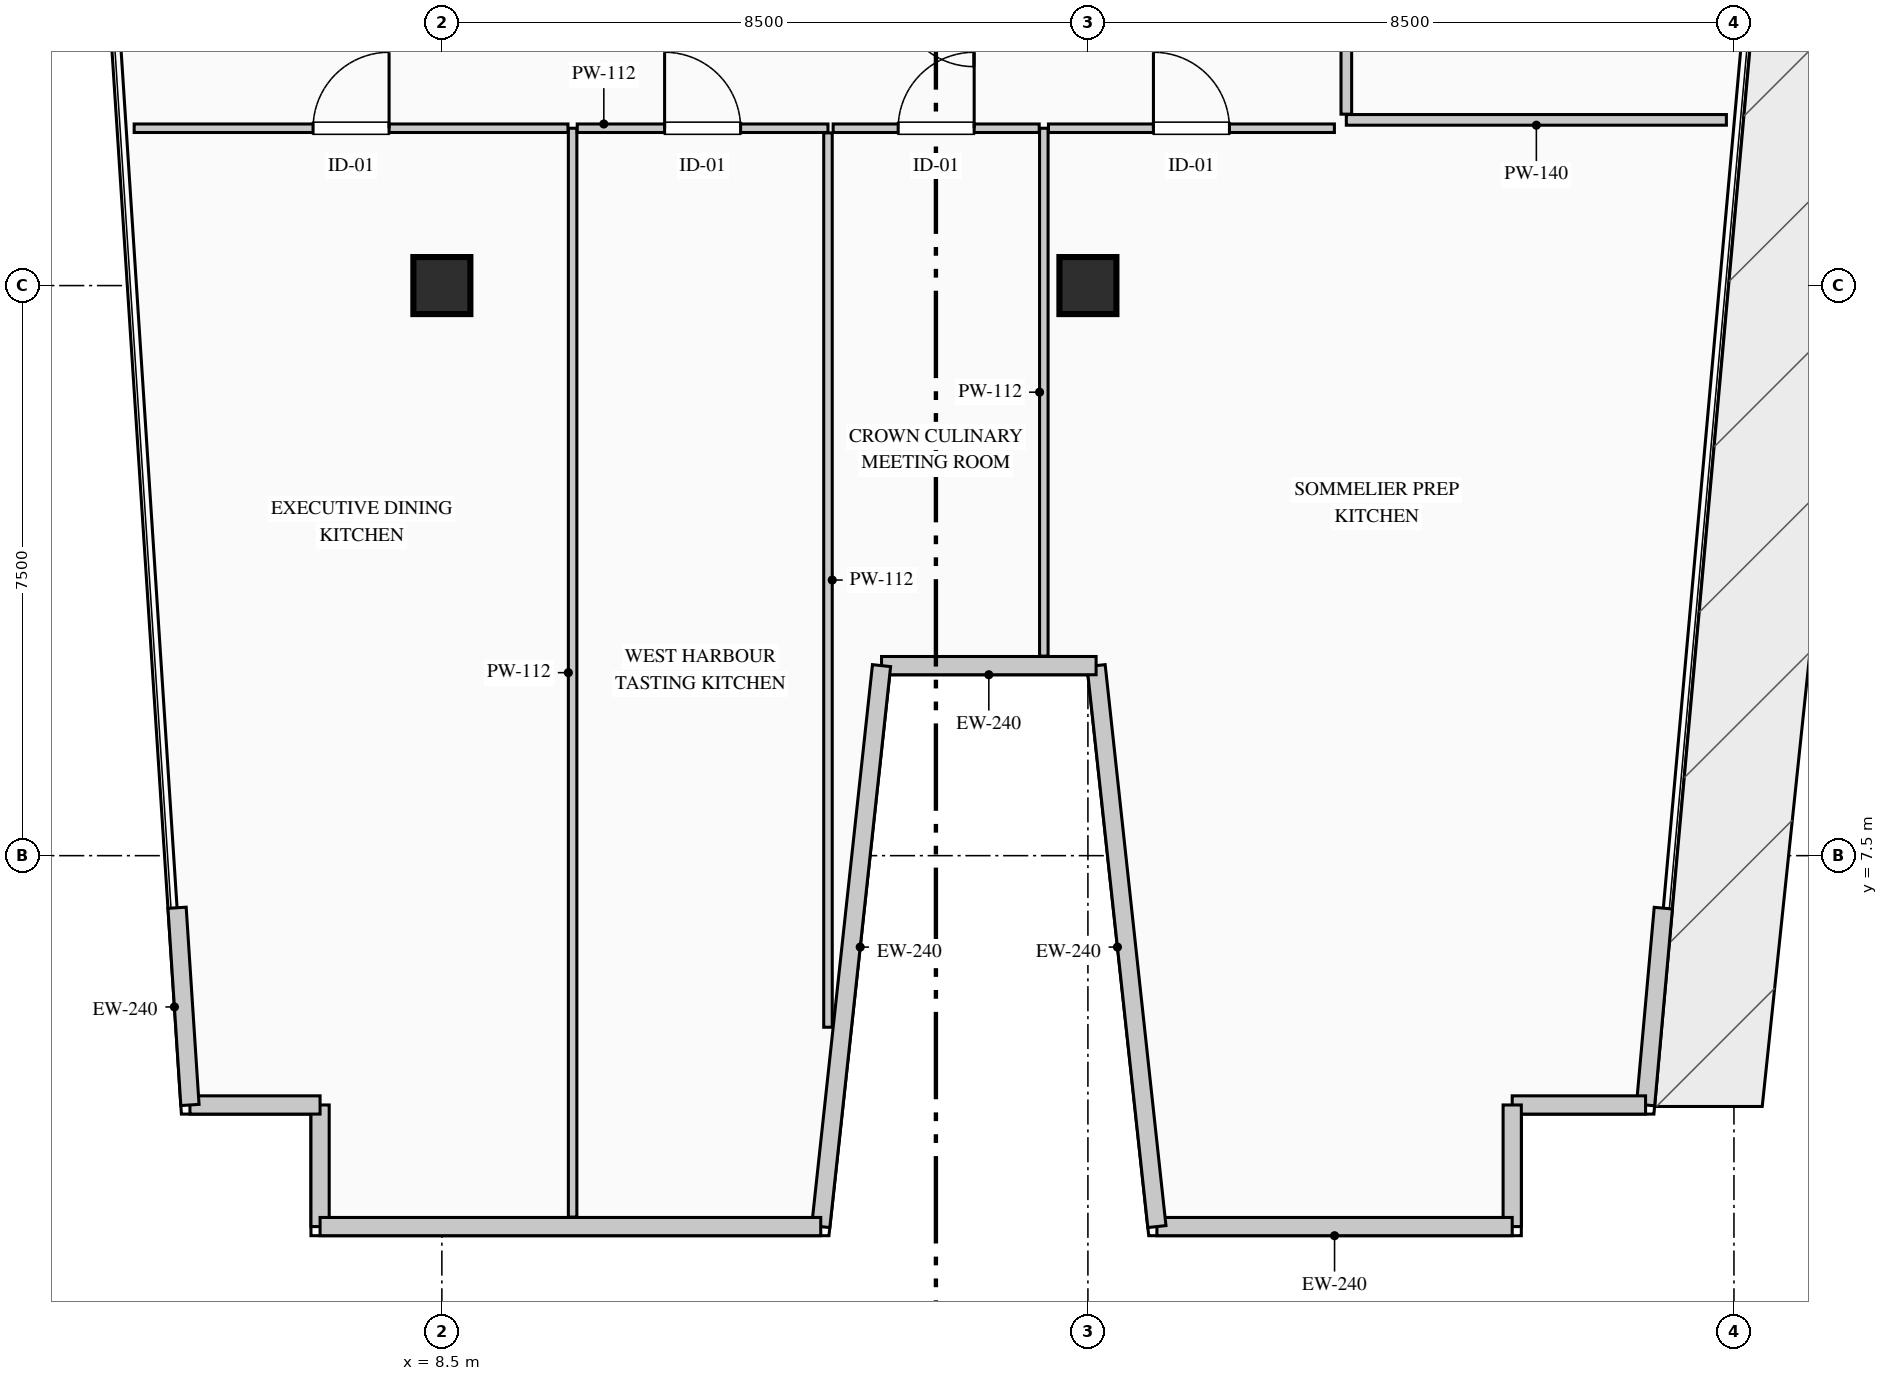
"""IFC4 building model, lengths in metres.
Left out: names, types, materials, properties, quantities, classifications, styles, units other than length and angle.
Written with IfcOpenShell. Run it as: python <this file> out.ifc"""

import sys

from ifc_helpers import new_model, si_unit, direction, frame, frame_2d, origin, origin_2d, place, context, subcontext, project, spatial, rectangle, extrude, element, fill, save


model = new_model("IFC4")
c1 = context("Model", 3, precision=1e-05, world=origin(), true_north=direction((0.0, 1.0)))
c2 = subcontext(c1, "Body", "Model", "MODEL_VIEW")
j1 = project(units=[si_unit("LENGTHUNIT", "METRE"), si_unit("PLANEANGLEUNIT", "RADIAN")], contexts=[c1])
p1 = place(None, origin())
s1 = spatial("IfcSite", under=j1, at=p1, CompositionType="ELEMENT")
p2 = place(p1, origin())
s2 = spatial("IfcBuilding", under=s1, at=p2, CompositionType="ELEMENT")
p3 = place(p2, frame((0.0, 0.0, 300.15)))
s3 = spatial("IfcBuildingStorey", under=s2, at=p3, CompositionType="ELEMENT", Elevation=300.15)
for number, where, z_axis, x_axis in (
    (1, (8.5, 15.0, 0.0), (0.0, 0.0, 1.0), (1.0, 0.0, 0.0)),
    (2, (17.0, 15.0, 0.0), (0.0, 0.0, 1.0), (1.0, 0.0, 0.0)),
):
    element("IfcColumn", number, at=place(p3, frame(where, z_axis=z_axis, x_axis=x_axis)), inside=s3, PredefinedType="COLUMN", context=c2, shape_type="SweptSolid", body=[
        extrude(rectangle(XDim=0.75, YDim=0.75, at=origin_2d()), origin(), (0.0, 0.0, 1.0), 3.95),
    ])
p4 = place(p3, frame((6.897, 2.62, 0.0), z_axis=(0.0, 0.0, 1.0), x_axis=(0.0, 1.0, 0.0)))
e3 = element("IfcWall", 3, at=p4, inside=s3, PredefinedType="STANDARD", context=c2, shape_type="SweptSolid", body=[
    extrude(rectangle(XDim=1.6, YDim=0.24, at=frame_2d((0.8, 0.0))), origin(), (0.0, 0.0, 1.0), 3.7),
])
p5 = place(p3, frame((6.897, 4.22, 0.0), z_axis=(0.0, 0.0, 1.0), x_axis=(-1.0, 0.0, 0.0)))
e4 = element("IfcWall", 4, at=p5, inside=s3, PredefinedType="STANDARD", context=c2, shape_type="SweptSolid", body=[
    extrude(rectangle(XDim=1.712, YDim=0.24, at=frame_2d((0.856, 0.0))), origin(), (0.0, 0.0, 1.0), 3.7),
])
for number, where, z_axis, x_axis in (
    (5, (5.185, 4.22, 0.0), (0.0, 0.0, 1.0), (-0.065, 0.998, 0.0)),
    (6, (24.571, 6.81, 0.0), (0.0, 0.0, 1.0), (-0.09, -0.996, 0.0)),
):
    element("IfcWall", number, at=place(p3, frame(where, z_axis=z_axis, x_axis=x_axis)), inside=s3, PredefinedType="STANDARD", context=c2, shape_type="SweptSolid", body=[
        extrude(rectangle(XDim=2.6, YDim=0.24, at=frame_2d((1.3, 0.0))), origin(), (0.0, 0.0, 1.0), 3.7),
    ])
p6 = place(p3, frame((24.337, 4.22, 0.0), z_axis=(0.0, 0.0, 1.0), x_axis=(-1.0, 0.0, 0.0)))
e7 = element("IfcWall", 7, at=p6, inside=s3, PredefinedType="STANDARD", context=c2, shape_type="SweptSolid", body=[
    extrude(rectangle(XDim=1.755, YDim=0.24, at=frame_2d((0.877, 0.0))), origin(), (0.0, 0.0, 1.0), 3.7),
])
p7 = place(p3, frame((22.583, 4.22, 0.0), z_axis=(0.0, 0.0, 1.0), x_axis=(0.0, -1.0, 0.0)))
e8 = element("IfcWall", 8, at=p7, inside=s3, PredefinedType="STANDARD", context=c2, shape_type="SweptSolid", body=[
    extrude(rectangle(XDim=1.6, YDim=0.24, at=frame_2d((0.8, 0.0))), origin(), (0.0, 0.0, 1.0), 3.7),
])
p8 = place(p3, frame((22.583, 2.62, 0.0), z_axis=(0.0, 0.0, 1.0), x_axis=(-1.0, 0.0, 0.0)))
e9 = element("IfcWall", 9, at=p8, inside=s3, PredefinedType="STANDARD", context=c2, shape_type="SweptSolid", body=[
    extrude(rectangle(XDim=4.675, YDim=0.24, at=frame_2d((2.337, 0.0))), origin(), (0.0, 0.0, 1.0), 3.7),
])
p9 = place(p3, frame((17.908, 2.62, 0.0), z_axis=(0.0, 0.0, 1.0), x_axis=(-0.107777936076, 0.994174992894, 0.0)))
e10 = element("IfcWall", 10, at=p9, inside=s3, PredefinedType="STANDARD", context=c2, shape_type="SweptSolid", body=[
    extrude(rectangle(XDim=7.423, YDim=0.24, at=frame_2d((3.711, 0.0))), origin(), (0.0, 0.0, 1.0), 3.7),
])
p10 = place(p3, frame((17.108, 10.0, 0.0), z_axis=(0.0, 0.0, 1.0), x_axis=(-1.0, 0.0, 0.0)))
e11 = element("IfcWall", 11, at=p10, inside=s3, PredefinedType="STANDARD", context=c2, shape_type="SweptSolid", body=[
    extrude(rectangle(XDim=2.823, YDim=0.24, at=frame_2d((1.411, 0.0))), origin(), (0.0, 0.0, 1.0), 3.7),
])
p11 = place(p3, frame((14.285, 10.0, 0.0), z_axis=(0.0, 0.0, 1.0), x_axis=(-0.107777936076, -0.994174992894, 0.0)))
e12 = element("IfcWall", 12, at=p11, inside=s3, PredefinedType="STANDARD", context=c2, shape_type="SweptSolid", body=[
    extrude(rectangle(XDim=7.423, YDim=0.24, at=frame_2d((3.711, 0.0))), origin(), (0.0, 0.0, 1.0), 3.7),
])
p12 = place(p3, frame((13.485, 2.62, 0.0), z_axis=(0.0, 0.0, 1.0), x_axis=(-1.0, 0.0, 0.0)))
e13 = element("IfcWall", 13, at=p12, inside=s3, PredefinedType="STANDARD", context=c2, shape_type="SweptSolid", body=[
    extrude(rectangle(XDim=6.587, YDim=0.24, at=frame_2d((3.294, 0.0))), origin(), (0.0, 0.0, 1.0), 3.7),
])
p13 = place(p3, frame((25.4, 17.18, 0.0), z_axis=(0.0, 0.0, 1.0), x_axis=(-1.0, 0.0, 0.0)))
e14 = element("IfcWall", 14, at=p13, inside=s3, PredefinedType="PARTITIONING", context=c2, shape_type="SweptSolid", body=[
    extrude(rectangle(XDim=5.0, YDim=0.14, at=frame_2d((2.5, 0.0))), origin(), (0.0, 0.0, 1.0), 3.7),
])
p14 = place(p3, frame((20.4, 17.255, 0.0), z_axis=(0.0, 0.0, 1.0), x_axis=(0.0, 1.0, 0.0)))
e15 = element("IfcWall", 15, at=p14, inside=s3, PredefinedType="PARTITIONING", context=c2, shape_type="SweptSolid", body=[
    extrude(rectangle(XDim=3.995, YDim=0.14, at=frame_2d((1.998, 0.0))), origin(), (0.0, 0.0, 1.0), 3.7),
])
p15 = place(p14, frame((1.522, 0.0, 0.0)))
e16 = element("IfcOpeningElement", 16, at=p15, cuts=e15, PredefinedType="OPENING", context=c2, shape_type="SweptSolid", body=[
    extrude(rectangle(XDim=0.95, YDim=2.15, at=frame_2d((0.475, 1.075))), frame((0.0, 0.08, 0.0), z_axis=(0.0, -1.0, 0.0), x_axis=(1.0, 0.0, 0.0)), (0.0, 0.0, 1.0), 0.16),
])
p16 = place(p3, frame((10.22, 2.745, 0.0), z_axis=(0.0, 0.0, 1.0), x_axis=(0.0, 1.0, 0.0)))
e17 = element("IfcWall", 17, at=p16, inside=s3, PredefinedType="PARTITIONING", context=c2, shape_type="SweptSolid", body=[
    extrude(rectangle(XDim=14.325, YDim=0.112, at=frame_2d((7.163, 0.0))), origin(), (0.0, 0.0, 1.0), 3.325),
])
p17 = place(p3, frame((10.281, 17.07, 0.0), z_axis=(0.0, 0.0, 1.0), x_axis=(1.0, 0.0, 0.0)))
e18 = element("IfcWall", 18, at=p17, inside=s3, PredefinedType="PARTITIONING", context=c2, shape_type="SweptSolid", body=[
    extrude(rectangle(XDim=3.299, YDim=0.112, at=frame_2d((1.649, 0.0))), origin(), (0.0, 0.0, 1.0), 3.7),
])
p18 = place(p17, frame((1.149, 0.0, 0.0)))
e19 = element("IfcOpeningElement", 19, at=p18, cuts=e18, PredefinedType="OPENING", context=c2, shape_type="SweptSolid", body=[
    extrude(rectangle(XDim=1.0, YDim=2.15, at=frame_2d((0.5, 1.075))), frame((0.0, 0.066, 0.0), z_axis=(0.0, -1.0, 0.0), x_axis=(1.0, 0.0, 0.0)), (0.0, 0.0, 1.0), 0.132),
])
p19 = place(p3, frame((13.58, 17.009, 0.0), z_axis=(0.0, 0.0, 1.0), x_axis=(0.0, -1.0, 0.0)))
e20 = element("IfcWall", 20, at=p19, inside=s3, PredefinedType="PARTITIONING", context=c2, shape_type="SweptSolid", body=[
    extrude(rectangle(XDim=11.766, YDim=0.112, at=frame_2d((5.883, 0.0))), origin(), (0.0, 0.0, 1.0), 3.7),
])
p20 = place(p3, frame((4.451, 17.07, 0.0), z_axis=(0.0, 0.0, 1.0), x_axis=(1.0, 0.0, 0.0)))
e21 = element("IfcWall", 21, at=p20, inside=s3, PredefinedType="PARTITIONING", context=c2, shape_type="SweptSolid", body=[
    extrude(rectangle(XDim=5.708, YDim=0.112, at=frame_2d((2.854, 0.0))), origin(), (0.0, 0.0, 1.0), 3.7),
])
p21 = place(p20, frame((2.354, 0.0, 0.0)))
e22 = element("IfcOpeningElement", 22, at=p21, cuts=e21, PredefinedType="OPENING", context=c2, shape_type="SweptSolid", body=[
    extrude(rectangle(XDim=1.0, YDim=2.15, at=frame_2d((0.5, 1.075))), frame((0.0, 0.066, 0.0), z_axis=(0.0, -1.0, 0.0), x_axis=(1.0, 0.0, 0.0)), (0.0, 0.0, 1.0), 0.132),
])
p22 = place(p3, frame((16.42, 10.125, 0.0), z_axis=(0.0, 0.0, 1.0), x_axis=(0.0, 1.0, 0.0)))
e23 = element("IfcWall", 23, at=p22, inside=s3, PredefinedType="PARTITIONING", context=c2, shape_type="SweptSolid", body=[
    extrude(rectangle(XDim=6.945, YDim=0.112, at=frame_2d((3.473, 0.0))), origin(), (0.0, 0.0, 1.0), 3.7),
])
p23 = place(p3, frame((16.481, 17.07, 0.0), z_axis=(0.0, 0.0, 1.0), x_axis=(1.0, 0.0, 0.0)))
e24 = element("IfcWall", 24, at=p23, inside=s3, PredefinedType="PARTITIONING", context=c2, shape_type="SweptSolid", body=[
    extrude(rectangle(XDim=3.762, YDim=0.112, at=frame_2d((1.881, 0.0))), origin(), (0.0, 0.0, 1.0), 3.7),
])
p24 = place(p23, frame((1.381, 0.0, 0.0)))
e25 = element("IfcOpeningElement", 25, at=p24, cuts=e24, PredefinedType="OPENING", context=c2, shape_type="SweptSolid", body=[
    extrude(rectangle(XDim=1.0, YDim=2.15, at=frame_2d((0.5, 1.075))), frame((0.0, 0.066, 0.0), z_axis=(0.0, -1.0, 0.0), x_axis=(1.0, 0.0, 0.0)), (0.0, 0.0, 1.0), 0.132),
])
p25 = place(p3, frame((13.648, 17.07, 0.0), z_axis=(0.0, 0.0, 1.0), x_axis=(1.0, 0.0, 0.0)))
e26 = element("IfcWall", 26, at=p25, inside=s3, PredefinedType="PARTITIONING", context=c2, shape_type="SweptSolid", body=[
    extrude(rectangle(XDim=2.711, YDim=0.112, at=frame_2d((1.355, 0.0))), origin(), (0.0, 0.0, 1.0), 3.7),
])
p26 = place(p25, frame((0.855, 0.0, 0.0)))
e27 = element("IfcOpeningElement", 27, at=p26, cuts=e26, PredefinedType="OPENING", context=c2, shape_type="SweptSolid", body=[
    extrude(rectangle(XDim=1.0, YDim=2.15, at=frame_2d((0.5, 1.075))), frame((0.0, 0.066, 0.0), z_axis=(0.0, -1.0, 0.0), x_axis=(1.0, 0.0, 0.0)), (0.0, 0.0, 1.0), 0.132),
])
p27 = place(p18, origin())
e28 = element("IfcDoor", 28, at=p27, inside=s3, OperationType="SINGLE_SWING_LEFT", PredefinedType="DOOR", context=c2, shape_type="SweptSolid", body=[
    extrude(rectangle(XDim=1.0, YDim=2.15, at=frame_2d((0.5, 1.075))), frame((0.0, 0.025, 0.0), z_axis=(0.0, -1.0, 0.0), x_axis=(1.0, 0.0, 0.0)), (0.0, 0.0, 1.0), 0.05),
])
fill(e19, e28)
p28 = place(p21, origin())
e29 = element("IfcDoor", 29, at=p28, inside=s3, OperationType="SINGLE_SWING_RIGHT", PredefinedType="DOOR", context=c2, shape_type="SweptSolid", body=[
    extrude(rectangle(XDim=1.0, YDim=2.15, at=frame_2d((0.5, 1.075))), frame((0.0, 0.025, 0.0), z_axis=(0.0, -1.0, 0.0), x_axis=(1.0, 0.0, 0.0)), (0.0, 0.0, 1.0), 0.05),
])
fill(e22, e29)
p29 = place(p24, origin())
e30 = element("IfcDoor", 30, at=p29, inside=s3, OperationType="SINGLE_SWING_LEFT", PredefinedType="DOOR", context=c2, shape_type="SweptSolid", body=[
    extrude(rectangle(XDim=1.0, YDim=2.15, at=frame_2d((0.5, 1.075))), frame((0.0, 0.025, 0.0), z_axis=(0.0, -1.0, 0.0), x_axis=(1.0, 0.0, 0.0)), (0.0, 0.0, 1.0), 0.05),
])
fill(e25, e30)
p30 = place(p26, origin())
e31 = element("IfcDoor", 31, at=p30, inside=s3, OperationType="SINGLE_SWING_RIGHT", PredefinedType="DOOR", context=c2, shape_type="SweptSolid", body=[
    extrude(rectangle(XDim=1.0, YDim=2.15, at=frame_2d((0.5, 1.075))), frame((0.0, 0.025, 0.0), z_axis=(0.0, -1.0, 0.0), x_axis=(1.0, 0.0, 0.0)), (0.0, 0.0, 1.0), 0.05),
])
fill(e27, e31)
save(model, sys.argv[1])
